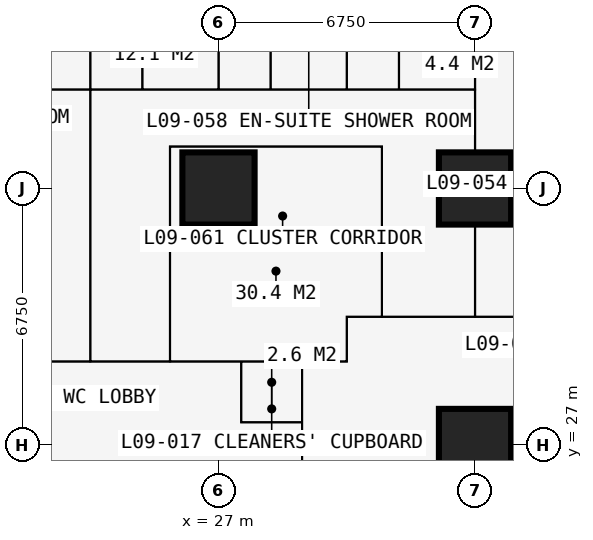
"""IFC4 building model, lengths in metres.
Left out: names, types, materials, properties, quantities, classifications, styles, units other than length and angle.
Written with IfcOpenShell. Run it as: python <this file> out.ifc"""

import sys

from ifc_helpers import new_model, si_unit, direction, frame, frame_2d, origin, origin_2d, place, context, subcontext, project, spatial, rectangle, extrude, element, fill, save


model = new_model("IFC4")
c1 = context("Model", 3, precision=1e-05, world=origin(), true_north=direction((0.0, 1.0)))
c2 = subcontext(c1, "Body", "Model", "MODEL_VIEW")
j1 = project(units=[si_unit("LENGTHUNIT", "METRE"), si_unit("PLANEANGLEUNIT", "RADIAN")], contexts=[c1])
p1 = place(None, origin())
s1 = spatial("IfcSite", under=j1, at=p1, CompositionType="ELEMENT")
p2 = place(p1, origin())
s2 = spatial("IfcBuilding", under=s1, at=p2, CompositionType="ELEMENT")
p3 = place(p2, frame((0.0, 0.0, 36.0)))
s3 = spatial("IfcBuildingStorey", under=s2, at=p3, CompositionType="ELEMENT", Elevation=36.0)
for number, where, z_axis, x_axis in (
    (1, (27.0, 33.75, 0.0), (0.0, 0.0, 1.0), (1.0, 0.0, 0.0)),
    (2, (33.75, 27.0, 0.0), (0.0, 0.0, 1.0), (1.0, 0.0, 0.0)),
    (3, (33.75, 33.75, 0.0), (0.0, 0.0, 1.0), (1.0, 0.0, 0.0)),
):
    element("IfcColumn", number, at=place(p3, frame(where, z_axis=z_axis, x_axis=x_axis)), inside=s3, PredefinedType="COLUMN", context=c2, shape_type="SweptSolid", body=[
        extrude(rectangle(XDim=1.9, YDim=1.9, at=origin_2d()), origin(), (0.0, 0.0, 1.0), 3.6),
    ])
p4 = place(p3, frame((27.6, 27.0, 0.0), z_axis=(0.0, 0.0, 1.0), x_axis=(-1.0, 0.0, 0.0)))
e4 = element("IfcWall", 4, at=p4, inside=s3, PredefinedType="SHEAR", context=c2, shape_type="SweptSolid", body=[
    extrude(rectangle(XDim=14.7, YDim=1.2, at=frame_2d((7.35, 0.0))), origin(), (0.0, 0.0, 1.0), 3.6),
])
p5 = place(p4, frame((4.55, 0.0, 0.0)))
e5 = element("IfcOpeningElement", 5, at=p5, cuts=e4, PredefinedType="OPENING", context=c2, shape_type="SweptSolid", body=[
    extrude(rectangle(XDim=0.9, YDim=2.2, at=frame_2d((0.45, 1.1))), frame((0.0, 0.61, 0.0), z_axis=(0.0, -1.0, 0.0), x_axis=(1.0, 0.0, 0.0)), (0.0, 0.0, 1.0), 1.22),
])
p6 = place(p4, frame((7.525, 0.0, 0.0)))
e6 = element("IfcOpeningElement", 6, at=p6, cuts=e4, PredefinedType="OPENING", context=c2, shape_type="SweptSolid", body=[
    extrude(rectangle(XDim=1.0, YDim=2.2, at=frame_2d((0.5, 1.1))), frame((0.0, 0.61, 0.0), z_axis=(0.0, -1.0, 0.0), x_axis=(1.0, 0.0, 0.0)), (0.0, 0.0, 1.0), 1.22),
])
p7 = place(p3, frame((10.125, 36.35, 0.0), z_axis=(0.0, 0.0, 1.0), x_axis=(1.0, 0.0, 0.0)))
e7 = element("IfcWall", 7, at=p7, inside=s3, PredefinedType="PARTITIONING", context=c2, shape_type="SweptSolid", body=[
    extrude(rectangle(XDim=23.625, YDim=0.15, at=frame_2d((11.812, 0.0))), origin(), (0.0, 0.0, 1.0), 3.375),
])
p8 = place(p7, frame((20.5, 0.0, 0.0)))
e8 = element("IfcOpeningElement", 8, at=p8, cuts=e7, PredefinedType="OPENING", context=c2, shape_type="SweptSolid", body=[
    extrude(rectangle(XDim=0.95, YDim=2.2, at=frame_2d((0.475, 1.1))), frame((0.0, 0.085, 0.0), z_axis=(0.0, -1.0, 0.0), x_axis=(1.0, 0.0, 0.0)), (0.0, 0.0, 1.0), 0.17),
])
p9 = place(p7, frame((17.125, 0.0, 0.0)))
e9 = element("IfcOpeningElement", 9, at=p9, cuts=e7, PredefinedType="OPENING", context=c2, shape_type="SweptSolid", body=[
    extrude(rectangle(XDim=0.95, YDim=2.2, at=frame_2d((0.475, 1.1))), frame((0.0, 0.085, 0.0), z_axis=(0.0, -1.0, 0.0), x_axis=(1.0, 0.0, 0.0)), (0.0, 0.0, 1.0), 0.17),
])
p10 = place(p7, frame((13.7, 0.0, 0.0)))
e10 = element("IfcOpeningElement", 10, at=p10, cuts=e7, PredefinedType="OPENING", context=c2, shape_type="SweptSolid", body=[
    extrude(rectangle(XDim=0.95, YDim=2.2, at=frame_2d((0.475, 1.1))), frame((0.0, 0.085, 0.0), z_axis=(0.0, -1.0, 0.0), x_axis=(1.0, 0.0, 0.0)), (0.0, 0.0, 1.0), 0.17),
])
p11 = place(p7, frame((4.2, 0.0, 0.0)))
e11 = element("IfcOpeningElement", 11, at=p11, cuts=e7, PredefinedType="OPENING", context=c2, shape_type="SweptSolid", body=[
    extrude(rectangle(XDim=0.95, YDim=2.2, at=frame_2d((0.475, 1.1))), frame((0.0, 0.085, 0.0), z_axis=(0.0, -1.0, 0.0), x_axis=(1.0, 0.0, 0.0)), (0.0, 0.0, 1.0), 0.17),
])
p12 = place(p7, frame((10.95, 0.0, 0.0)))
e12 = element("IfcOpeningElement", 12, at=p12, cuts=e7, PredefinedType="OPENING", context=c2, shape_type="SweptSolid", body=[
    extrude(rectangle(XDim=0.95, YDim=2.2, at=frame_2d((0.475, 1.1))), frame((0.0, 0.085, 0.0), z_axis=(0.0, -1.0, 0.0), x_axis=(1.0, 0.0, 0.0)), (0.0, 0.0, 1.0), 0.17),
])
p13 = place(p3, frame((11.3, 29.2, 0.0), z_axis=(0.0, 0.0, 1.0), x_axis=(1.0, 0.0, 0.0)))
e13 = element("IfcWall", 13, at=p13, inside=s3, PredefinedType="PARTITIONING", context=c2, shape_type="SweptSolid", body=[
    extrude(rectangle(XDim=19.075, YDim=0.15, at=frame_2d((9.538, 0.0))), origin(), (0.0, 0.0, 1.0), 3.375),
])
p14 = place(p13, frame((12.875, 0.0, 0.0)))
e14 = element("IfcOpeningElement", 14, at=p14, cuts=e13, PredefinedType="OPENING", context=c2, shape_type="SweptSolid", body=[
    extrude(rectangle(XDim=1.0, YDim=2.2, at=frame_2d((0.5, 1.1))), frame((0.0, 0.085, 0.0), z_axis=(0.0, -1.0, 0.0), x_axis=(1.0, 0.0, 0.0)), (0.0, 0.0, 1.0), 0.17),
])
p15 = place(p13, frame((10.438, 0.0, 0.0)))
e15 = element("IfcOpeningElement", 15, at=p15, cuts=e13, PredefinedType="OPENING", context=c2, shape_type="SweptSolid", body=[
    extrude(rectangle(XDim=1.0, YDim=2.2, at=frame_2d((0.5, 1.1))), frame((0.0, 0.085, 0.0), z_axis=(0.0, -1.0, 0.0), x_axis=(1.0, 0.0, 0.0)), (0.0, 0.0, 1.0), 0.17),
])
p16 = place(p13, frame((14.875, 0.0, 0.0)))
e16 = element("IfcOpeningElement", 16, at=p16, cuts=e13, PredefinedType="OPENING", context=c2, shape_type="SweptSolid", body=[
    extrude(rectangle(XDim=0.95, YDim=2.2, at=frame_2d((0.475, 1.1))), frame((0.0, 0.085, 0.0), z_axis=(0.0, -1.0, 0.0), x_axis=(1.0, 0.0, 0.0)), (0.0, 0.0, 1.0), 0.17),
])
p17 = place(p3, frame((23.625, 29.2, 0.0), z_axis=(0.0, 0.0, 1.0), x_axis=(0.0, 1.0, 0.0)))
e17 = element("IfcWall", 17, at=p17, inside=s3, PredefinedType="PARTITIONING", context=c2, shape_type="SweptSolid", body=[
    extrude(rectangle(XDim=12.034, YDim=0.15, at=frame_2d((6.017, 0.0))), origin(), (0.0, 0.0, 1.0), 3.375),
])
p18 = place(p3, frame((25.0, 36.35, 0.0), z_axis=(0.0, 0.0, 1.0), x_axis=(0.0, 1.0, 0.0)))
e18 = element("IfcWall", 18, at=p18, inside=s3, PredefinedType="PARTITIONING", context=c2, shape_type="SweptSolid", body=[
    extrude(rectangle(XDim=2.2, YDim=0.1, at=frame_2d((1.1, 0.0))), origin(), (0.0, 0.0, 1.0), 3.375),
])
p19 = place(p3, frame((25.725, 29.2, 0.0), z_axis=(0.0, 0.0, 1.0), x_axis=(0.0, 1.0, 0.0)))
e19 = element("IfcWall", 19, at=p19, inside=s3, PredefinedType="PARTITIONING", context=c2, shape_type="SweptSolid", body=[
    extrude(rectangle(XDim=5.65, YDim=0.15, at=frame_2d((2.825, 0.0))), origin(), (0.0, 0.0, 1.0), 3.375),
])
p20 = place(p3, frame((25.725, 34.85, 0.0), z_axis=(0.0, 0.0, 1.0), x_axis=(1.0, 0.0, 0.0)))
e20 = element("IfcWall", 20, at=p20, inside=s3, PredefinedType="PARTITIONING", context=c2, shape_type="SweptSolid", body=[
    extrude(rectangle(XDim=5.575, YDim=0.15, at=frame_2d((2.788, 0.0))), origin(), (0.0, 0.0, 1.0), 3.375),
])
p21 = place(p3, frame((27.0, 36.35, 0.0), z_axis=(0.0, 0.0, 1.0), x_axis=(0.0, 1.0, 0.0)))
e21 = element("IfcWall", 21, at=p21, inside=s3, PredefinedType="PARTITIONING", context=c2, shape_type="SweptSolid", body=[
    extrude(rectangle(XDim=4.884, YDim=0.175, at=frame_2d((2.442, 0.0))), origin(), (0.0, 0.0, 1.0), 2.877),
])
p22 = place(p21, frame((0.65, 0.0, 0.0)))
e22 = element("IfcOpeningElement", 22, at=p22, cuts=e21, PredefinedType="OPENING", context=c2, shape_type="SweptSolid", body=[
    extrude(rectangle(XDim=0.9, YDim=2.2, at=frame_2d((0.45, 1.1))), frame((0.0, 0.097, 0.0), z_axis=(0.0, -1.0, 0.0), x_axis=(1.0, 0.0, 0.0)), (0.0, 0.0, 1.0), 0.195),
])
p23 = place(p3, frame((27.6, 27.6, 0.0), z_axis=(0.0, 0.0, 1.0), x_axis=(0.0, 1.0, 0.0)))
e23 = element("IfcWall", 23, at=p23, inside=s3, PredefinedType="PARTITIONING", context=c2, shape_type="SweptSolid", body=[
    extrude(rectangle(XDim=1.6, YDim=0.15, at=frame_2d((0.8, 0.0))), origin(), (0.0, 0.0, 1.0), 3.375),
])
p24 = place(p23, frame((0.3, 0.0, 0.0)))
e24 = element("IfcOpeningElement", 24, at=p24, cuts=e23, PredefinedType="OPENING", context=c2, shape_type="SweptSolid", body=[
    extrude(rectangle(XDim=0.95, YDim=2.2, at=frame_2d((0.475, 1.1))), frame((0.0, 0.085, 0.0), z_axis=(0.0, -1.0, 0.0), x_axis=(1.0, 0.0, 0.0)), (0.0, 0.0, 1.0), 0.17),
])
p25 = place(p3, frame((27.6, 27.6, 0.0), z_axis=(0.0, 0.0, 1.0), x_axis=(1.0, 0.0, 0.0)))
e25 = element("IfcWall", 25, at=p25, inside=s3, PredefinedType="PARTITIONING", context=c2, shape_type="SweptSolid", body=[
    extrude(rectangle(XDim=1.6, YDim=0.15, at=frame_2d((0.8, 0.0))), origin(), (0.0, 0.0, 1.0), 2.877),
])
p26 = place(p3, frame((28.375, 36.35, 0.0), z_axis=(0.0, 0.0, 1.0), x_axis=(0.0, 1.0, 0.0)))
e26 = element("IfcWall", 26, at=p26, inside=s3, PredefinedType="PARTITIONING", context=c2, shape_type="SweptSolid", body=[
    extrude(rectangle(XDim=2.2, YDim=0.1, at=frame_2d((1.1, 0.0))), origin(), (0.0, 0.0, 1.0), 3.375),
])
p27 = place(p3, frame((29.2, 11.3, 0.0), z_axis=(0.0, 0.0, 1.0), x_axis=(0.0, 1.0, 0.0)))
e27 = element("IfcWall", 27, at=p27, inside=s3, PredefinedType="PARTITIONING", context=c2, shape_type="SweptSolid", body=[
    extrude(rectangle(XDim=17.9, YDim=0.2, at=frame_2d((8.95, 0.0))), origin(), (0.0, 0.0, 1.0), 3.375),
])
p28 = place(p27, frame((8.35, 0.0, 0.0)))
e28 = element("IfcOpeningElement", 28, at=p28, cuts=e27, PredefinedType="OPENING", context=c2, shape_type="SweptSolid", body=[
    extrude(rectangle(XDim=1.2, YDim=2.2, at=frame_2d((0.6, 1.1))), frame((0.0, 0.11, 0.0), z_axis=(0.0, -1.0, 0.0), x_axis=(1.0, 0.0, 0.0)), (0.0, 0.0, 1.0), 0.22),
])
p29 = place(p3, frame((30.375, 29.2, 0.0), z_axis=(0.0, 0.0, 1.0), x_axis=(0.0, 1.0, 0.0)))
e29 = element("IfcWall", 29, at=p29, inside=s3, PredefinedType="PARTITIONING", context=c2, shape_type="SweptSolid", body=[
    extrude(rectangle(XDim=1.175, YDim=0.15, at=frame_2d((0.587, 0.0))), origin(), (0.0, 0.0, 1.0), 3.375),
])
p30 = place(p3, frame((30.375, 30.375, 0.0), z_axis=(0.0, 0.0, 1.0), x_axis=(1.0, 0.0, 0.0)))
e30 = element("IfcWall", 30, at=p30, inside=s3, PredefinedType="PARTITIONING", context=c2, shape_type="SweptSolid", body=[
    extrude(rectangle(XDim=10.859, YDim=0.15, at=frame_2d((5.429, 0.0))), origin(), (0.0, 0.0, 1.0), 3.375),
])
p31 = place(p3, frame((30.375, 36.35, 0.0), z_axis=(0.0, 0.0, 1.0), x_axis=(0.0, 1.0, 0.0)))
e31 = element("IfcWall", 31, at=p31, inside=s3, PredefinedType="PARTITIONING", context=c2, shape_type="SweptSolid", body=[
    extrude(rectangle(XDim=4.884, YDim=0.175, at=frame_2d((2.442, 0.0))), origin(), (0.0, 0.0, 1.0), 3.375),
])
p32 = place(p31, frame((0.65, 0.0, 0.0)))
e32 = element("IfcOpeningElement", 32, at=p32, cuts=e31, PredefinedType="OPENING", context=c2, shape_type="SweptSolid", body=[
    extrude(rectangle(XDim=0.9, YDim=2.2, at=frame_2d((0.45, 1.1))), frame((0.0, 0.097, 0.0), z_axis=(0.0, -1.0, 0.0), x_axis=(1.0, 0.0, 0.0)), (0.0, 0.0, 1.0), 0.195),
])
p33 = place(p3, frame((31.3, 30.375, 0.0), z_axis=(0.0, 0.0, 1.0), x_axis=(0.0, 1.0, 0.0)))
e33 = element("IfcWall", 33, at=p33, inside=s3, PredefinedType="PARTITIONING", context=c2, shape_type="SweptSolid", body=[
    extrude(rectangle(XDim=4.475, YDim=0.15, at=frame_2d((2.238, 0.0))), origin(), (0.0, 0.0, 1.0), 3.375),
])
p34 = place(p3, frame((31.75, 36.35, 0.0), z_axis=(0.0, 0.0, 1.0), x_axis=(0.0, 1.0, 0.0)))
e34 = element("IfcWall", 34, at=p34, inside=s3, PredefinedType="PARTITIONING", context=c2, shape_type="SweptSolid", body=[
    extrude(rectangle(XDim=2.2, YDim=0.1, at=frame_2d((1.1, 0.0))), origin(), (0.0, 0.0, 1.0), 3.375),
])
p35 = place(p34, frame((0.65, 0.0, 0.0)))
e35 = element("IfcOpeningElement", 35, at=p35, cuts=e34, PredefinedType="OPENING", context=c2, shape_type="SweptSolid", body=[
    extrude(rectangle(XDim=0.9, YDim=2.2, at=frame_2d((0.45, 1.1))), frame((0.0, 0.06, 0.0), z_axis=(0.0, -1.0, 0.0), x_axis=(1.0, 0.0, 0.0)), (0.0, 0.0, 1.0), 0.12),
])
p36 = place(p3, frame((33.75, 30.375, 0.0), z_axis=(0.0, 0.0, 1.0), x_axis=(0.0, 1.0, 0.0)))
e36 = element("IfcWall", 36, at=p36, inside=s3, PredefinedType="PARTITIONING", context=c2, shape_type="SweptSolid", body=[
    extrude(rectangle(XDim=10.859, YDim=0.15, at=frame_2d((5.429, 0.0))), origin(), (0.0, 0.0, 1.0), 2.877),
])
p37 = place(p36, frame((1.4, 0.0, 0.0)))
e37 = element("IfcOpeningElement", 37, at=p37, cuts=e36, PredefinedType="OPENING", context=c2, shape_type="SweptSolid", body=[
    extrude(rectangle(XDim=1.0, YDim=2.2, at=frame_2d((0.5, 1.1))), frame((0.0, 0.085, 0.0), z_axis=(0.0, -1.0, 0.0), x_axis=(1.0, 0.0, 0.0)), (0.0, 0.0, 1.0), 0.17),
])
p38 = place(p5, origin())
e38 = element("IfcDoor", 38, at=p38, inside=s3, OperationType="SINGLE_SWING_LEFT", PredefinedType="DOOR", context=c2, shape_type="SweptSolid", body=[
    extrude(rectangle(XDim=0.9, YDim=2.2, at=frame_2d((0.45, 1.1))), frame((0.0, 0.4, 0.0), z_axis=(0.0, -1.0, 0.0), x_axis=(1.0, 0.0, 0.0)), (0.0, 0.0, 1.0), 0.8),
])
fill(e5, e38)
p39 = place(p24, origin())
e39 = element("IfcDoor", 39, at=p39, inside=s3, OperationType="SINGLE_SWING_LEFT", PredefinedType="DOOR", context=c2, shape_type="SweptSolid", body=[
    extrude(rectangle(XDim=0.95, YDim=2.2, at=frame_2d((0.475, 1.1))), frame((0.0, 0.025, 0.0), z_axis=(0.0, -1.0, 0.0), x_axis=(1.0, 0.0, 0.0)), (0.0, 0.0, 1.0), 0.05),
])
fill(e24, e39)
p40 = place(p37, origin())
e40 = element("IfcDoor", 40, at=p40, inside=s3, OperationType="SINGLE_SWING_LEFT", PredefinedType="DOOR", context=c2, shape_type="SweptSolid", body=[
    extrude(rectangle(XDim=1.0, YDim=2.2, at=frame_2d((0.5, 1.1))), frame((0.0, 0.025, 0.0), z_axis=(0.0, -1.0, 0.0), x_axis=(1.0, 0.0, 0.0)), (0.0, 0.0, 1.0), 0.05),
])
fill(e37, e40)
p41 = place(p8, origin())
e41 = element("IfcDoor", 41, at=p41, inside=s3, OperationType="SINGLE_SWING_LEFT", PredefinedType="DOOR", context=c2, shape_type="SweptSolid", body=[
    extrude(rectangle(XDim=0.95, YDim=2.2, at=frame_2d((0.475, 1.1))), frame((0.0, 0.025, 0.0), z_axis=(0.0, -1.0, 0.0), x_axis=(1.0, 0.0, 0.0)), (0.0, 0.0, 1.0), 0.05),
])
fill(e8, e41)
p42 = place(p35, origin())
e42 = element("IfcDoor", 42, at=p42, inside=s3, OperationType="SINGLE_SWING_RIGHT", PredefinedType="DOOR", context=c2, shape_type="SweptSolid", body=[
    extrude(rectangle(XDim=0.9, YDim=2.2, at=frame_2d((0.45, 1.1))), frame((0.0, 0.025, 0.0), z_axis=(0.0, -1.0, 0.0), x_axis=(1.0, 0.0, 0.0)), (0.0, 0.0, 1.0), 0.05),
])
fill(e35, e42)
p43 = place(p9, origin())
e43 = element("IfcDoor", 43, at=p43, inside=s3, OperationType="SINGLE_SWING_LEFT", PredefinedType="DOOR", context=c2, shape_type="SweptSolid", body=[
    extrude(rectangle(XDim=0.95, YDim=2.2, at=frame_2d((0.475, 1.1))), frame((0.0, 0.025, 0.0), z_axis=(0.0, -1.0, 0.0), x_axis=(1.0, 0.0, 0.0)), (0.0, 0.0, 1.0), 0.05),
])
fill(e9, e43)
p44 = place(p32, origin())
e44 = element("IfcDoor", 44, at=p44, inside=s3, OperationType="SINGLE_SWING_RIGHT", PredefinedType="DOOR", context=c2, shape_type="SweptSolid", body=[
    extrude(rectangle(XDim=0.9, YDim=2.2, at=frame_2d((0.45, 1.1))), frame((0.0, 0.025, 0.0), z_axis=(0.0, -1.0, 0.0), x_axis=(1.0, 0.0, 0.0)), (0.0, 0.0, 1.0), 0.05),
])
fill(e32, e44)
p45 = place(p10, origin())
e45 = element("IfcDoor", 45, at=p45, inside=s3, OperationType="SINGLE_SWING_LEFT", PredefinedType="DOOR", context=c2, shape_type="SweptSolid", body=[
    extrude(rectangle(XDim=0.95, YDim=2.2, at=frame_2d((0.475, 1.1))), frame((0.0, 0.025, 0.0), z_axis=(0.0, -1.0, 0.0), x_axis=(1.0, 0.0, 0.0)), (0.0, 0.0, 1.0), 0.05),
])
fill(e10, e45)
p46 = place(p22, origin())
e46 = element("IfcDoor", 46, at=p46, inside=s3, OperationType="SINGLE_SWING_RIGHT", PredefinedType="DOOR", context=c2, shape_type="SweptSolid", body=[
    extrude(rectangle(XDim=0.9, YDim=2.2, at=frame_2d((0.45, 1.1))), frame((0.0, 0.025, 0.0), z_axis=(0.0, -1.0, 0.0), x_axis=(1.0, 0.0, 0.0)), (0.0, 0.0, 1.0), 0.05),
])
fill(e22, e46)
p47 = place(p14, origin())
e47 = element("IfcDoor", 47, at=p47, inside=s3, OperationType="SINGLE_SWING_LEFT", PredefinedType="DOOR", context=c2, shape_type="SweptSolid", body=[
    extrude(rectangle(XDim=1.0, YDim=2.2, at=frame_2d((0.5, 1.1))), frame((0.0, 0.025, 0.0), z_axis=(0.0, -1.0, 0.0), x_axis=(1.0, 0.0, 0.0)), (0.0, 0.0, 1.0), 0.05),
])
fill(e14, e47)
p48 = place(p15, origin())
e48 = element("IfcDoor", 48, at=p48, inside=s3, OperationType="SINGLE_SWING_LEFT", PredefinedType="DOOR", context=c2, shape_type="SweptSolid", body=[
    extrude(rectangle(XDim=1.0, YDim=2.2, at=frame_2d((0.5, 1.1))), frame((0.0, 0.025, 0.0), z_axis=(0.0, -1.0, 0.0), x_axis=(1.0, 0.0, 0.0)), (0.0, 0.0, 1.0), 0.05),
])
fill(e15, e48)
p49 = place(p16, origin())
e49 = element("IfcDoor", 49, at=p49, inside=s3, OperationType="SINGLE_SWING_LEFT", PredefinedType="DOOR", context=c2, shape_type="SweptSolid", body=[
    extrude(rectangle(XDim=0.95, YDim=2.2, at=frame_2d((0.475, 1.1))), frame((0.0, 0.025, 0.0), z_axis=(0.0, -1.0, 0.0), x_axis=(1.0, 0.0, 0.0)), (0.0, 0.0, 1.0), 0.05),
])
fill(e16, e49)
save(model, sys.argv[1])
